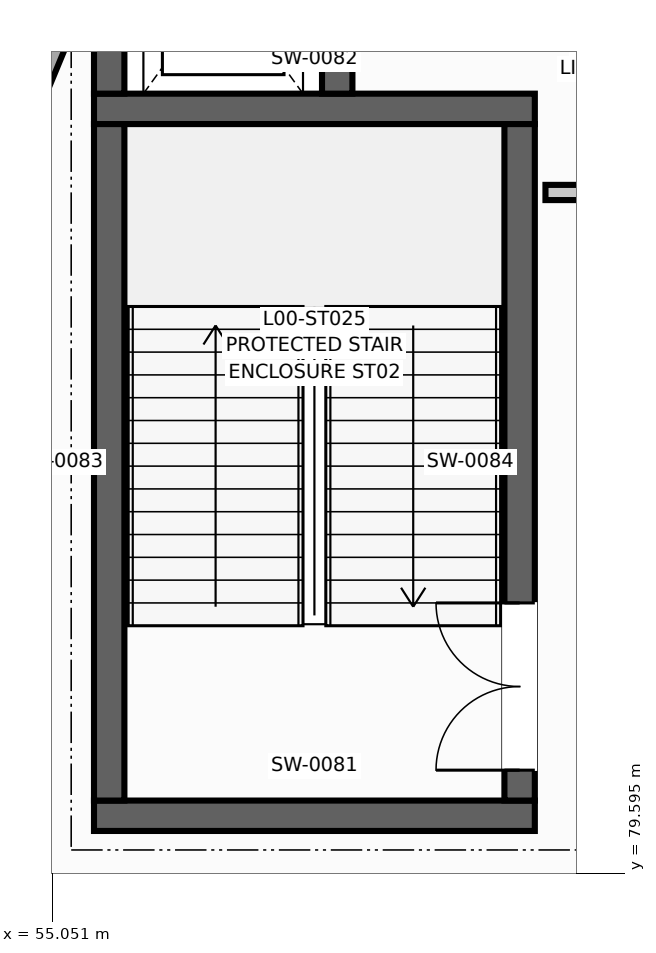
"""IFC4 building model, lengths in metres.
Left out: names, types, materials, properties, quantities, classifications, styles, units other than length and angle.
Written with IfcOpenShell. Run it as: python <this file> out.ifc"""

import sys

from ifc_helpers import new_model, si_unit, direction, frame, frame_2d, origin, place, context, subcontext, project, spatial, rectangle, extrude, element, fill, save


model = new_model("IFC4")
c1 = context("Model", 3, precision=1e-05, world=origin(), true_north=direction((0.0, 1.0)))
c2 = subcontext(c1, "Body", "Model", "MODEL_VIEW")
j1 = project(units=[si_unit("LENGTHUNIT", "METRE"), si_unit("PLANEANGLEUNIT", "RADIAN")], contexts=[c1])
p1 = place(None, origin())
s1 = spatial("IfcSite", under=j1, at=p1, CompositionType="ELEMENT")
p2 = place(p1, origin())
s2 = spatial("IfcBuilding", under=s1, at=p2, CompositionType="ELEMENT")
p3 = place(p2, origin())
s3 = spatial("IfcBuildingStorey", under=s2, at=p3, CompositionType="ELEMENT", Elevation=0.0)
p4 = place(p3, frame((59.202, 100.4, 0.0), z_axis=(0.0, 0.0, 1.0), x_axis=(-0.382632655327, -0.923900563414, 0.0)))
e1 = element("IfcWall", 1, at=p4, inside=s3, PredefinedType="SOLIDWALL", context=c2, shape_type="SweptSolid", body=[
    extrude(rectangle(XDim=11.695, YDim=0.26, at=frame_2d((5.847, 0.0))), origin(), (0.0, 0.0, 1.0), 3.68),
])
p5 = place(p4, frame((4.948, 0.0, 0.0)))
e2 = element("IfcOpeningElement", 2, at=p5, cuts=e1, PredefinedType="OPENING", context=c2, shape_type="SweptSolid", body=[
    extrude(rectangle(XDim=1.8, YDim=2.35, at=frame_2d((0.9, 1.175))), frame((0.0, 0.14, 0.0), z_axis=(0.0, -1.0, 0.0), x_axis=(1.0, 0.0, 0.0)), (0.0, 0.0, 1.0), 0.28),
])
for number, where, z_axis, x_axis in (
    (3, (55.6, 80.35, 0.0), (0.0, 0.0, 1.0), (1.0, 0.0, 0.0)),
    (4, (55.6, 89.65, 0.0), (0.0, 0.0, 1.0), (1.0, 0.0, 0.0)),
):
    element("IfcWall", number, at=place(p3, frame(where, z_axis=z_axis, x_axis=x_axis)), inside=s3, PredefinedType="SHEAR", context=c2, shape_type="SweptSolid", body=[
        extrude(rectangle(XDim=5.8, YDim=0.4, at=frame_2d((2.9, 0.0))), origin(), (0.0, 0.0, 1.0), 4.225),
    ])
p6 = place(p3, frame((55.8, 80.55, 0.0), z_axis=(0.0, 0.0, 1.0), x_axis=(0.0, 1.0, 0.0)))
e5 = element("IfcWall", 5, at=p6, inside=s3, PredefinedType="SHEAR", context=c2, shape_type="SweptSolid", body=[
    extrude(rectangle(XDim=8.9, YDim=0.4, at=frame_2d((4.45, 0.0))), origin(), (0.0, 0.0, 1.0), 4.225),
])
p7 = place(p3, frame((61.2, 80.55, 0.0), z_axis=(0.0, 0.0, 1.0), x_axis=(0.0, 1.0, 0.0)))
e6 = element("IfcWall", 6, at=p7, inside=s3, PredefinedType="SHEAR", context=c2, shape_type="SweptSolid", body=[
    extrude(rectangle(XDim=8.9, YDim=0.4, at=frame_2d((4.45, 0.0))), origin(), (0.0, 0.0, 1.0), 4.225),
])
p8 = place(p7, frame((0.4, 0.0, 0.0)))
e7 = element("IfcOpeningElement", 7, at=p8, cuts=e6, PredefinedType="OPENING", context=c2, shape_type="SweptSolid", body=[
    extrude(rectangle(XDim=2.2, YDim=2.3, at=frame_2d((1.1, 1.15))), frame((0.0, 0.21, 0.0), z_axis=(0.0, -1.0, 0.0), x_axis=(1.0, 0.0, 0.0)), (0.0, 0.0, 1.0), 0.42),
])
p9 = place(p3, frame((55.8, 89.85, 0.0), z_axis=(0.0, 0.0, 1.0), x_axis=(0.0, 1.0, 0.0)))
e8 = element("IfcWall", 8, at=p9, inside=s3, PredefinedType="SHEAR", context=c2, shape_type="SweptSolid", body=[
    extrude(rectangle(XDim=2.9, YDim=0.4, at=frame_2d((1.45, 0.0))), origin(), (0.0, 0.0, 1.0), 4.225),
])
p10 = place(p3, frame((58.8, 89.85, 0.0), z_axis=(0.0, 0.0, 1.0), x_axis=(0.0, 1.0, 0.0)))
e9 = element("IfcWall", 9, at=p10, inside=s3, PredefinedType="SHEAR", context=c2, shape_type="SweptSolid", body=[
    extrude(rectangle(XDim=2.9, YDim=0.4, at=frame_2d((1.45, 0.0))), origin(), (0.0, 0.0, 1.0), 4.225),
])
p11 = place(p10, frame((0.9, 0.0, 0.0)))
e10 = element("IfcOpeningElement", 10, at=p11, cuts=e9, PredefinedType="OPENING", context=c2, shape_type="SweptSolid", body=[
    extrude(rectangle(XDim=1.1, YDim=2.2, at=frame_2d((0.55, 1.1))), frame((0.0, 0.21, 0.0), z_axis=(0.0, -1.0, 0.0), x_axis=(1.0, 0.0, 0.0)), (0.0, 0.0, 1.0), 0.42),
])
p12 = place(p3, frame((61.54, 88.55, 0.0), z_axis=(0.0, 0.0, 1.0), x_axis=(1.0, 0.0, 0.0)))
e11 = element("IfcWall", 11, at=p12, inside=s3, PredefinedType="PARTITIONING", context=c2, shape_type="SweptSolid", body=[
    extrude(rectangle(XDim=4.18, YDim=0.2, at=frame_2d((2.09, 0.0))), origin(), (0.0, 0.0, 1.0), 3.22),
])
p13 = place(p8, origin())
e12 = element("IfcDoor", 12, at=p13, inside=s3, OperationType="DOUBLE_DOOR_SINGLE_SWING", PredefinedType="DOOR", context=c2, shape_type="SweptSolid", body=[
    extrude(rectangle(XDim=2.2, YDim=2.3, at=frame_2d((1.1, 1.15))), frame((0.0, 0.025, 0.0), z_axis=(0.0, -1.0, 0.0), x_axis=(1.0, 0.0, 0.0)), (0.0, 0.0, 1.0), 0.05),
])
fill(e7, e12)
save(model, sys.argv[1])
